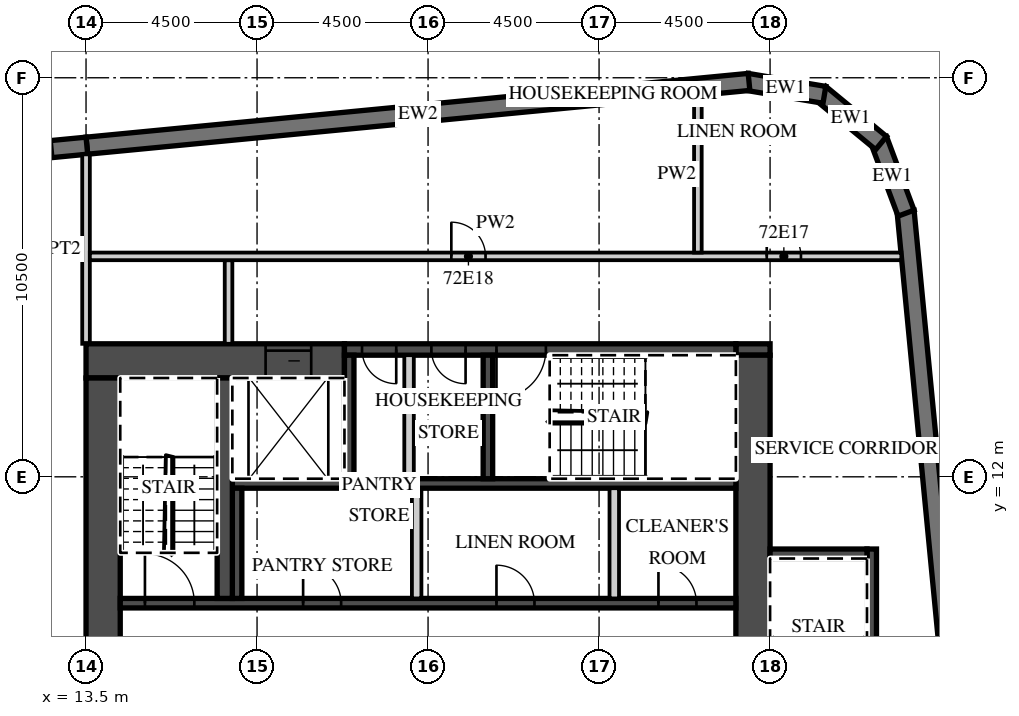
"""IFC4 building model, lengths in metres.
Left out: names, types, materials, properties, quantities, classifications, styles, units other than length and angle.
Written with IfcOpenShell. Run it as: python <this file> out.ifc"""

import sys

from ifc_helpers import new_model, si_unit, direction, frame, frame_2d, origin, place, context, subcontext, project, spatial, polyline, rectangle, outline, extrude, element, fill, save


model = new_model("IFC4")
c1 = context("Model", 3, precision=1e-05, world=origin(), true_north=direction((0.0, 1.0)))
c2 = subcontext(c1, "Body", "Model", "MODEL_VIEW")
j1 = project(units=[si_unit("LENGTHUNIT", "METRE"), si_unit("PLANEANGLEUNIT", "RADIAN")], contexts=[c1])
p1 = place(None, origin())
s1 = spatial("IfcSite", under=j1, at=p1, CompositionType="ELEMENT")
p2 = place(p1, origin())
s2 = spatial("IfcBuilding", under=s1, at=p2, CompositionType="ELEMENT")
p3 = place(p2, frame((0.0, 0.0, 288.3)))
s3 = spatial("IfcBuildingStorey", under=s2, at=p3, CompositionType="ELEMENT", Elevation=288.3)
p4 = place(p3, frame((38.132, -12.858, 0.0), z_axis=(0.0, 0.0, 1.0), x_axis=(-0.095847749461, 0.995396006082, 0.0)))
e1 = element("IfcWall", 1, at=p4, inside=s3, PredefinedType="SOLIDWALL", context=c2, shape_type="SweptSolid", body=[
    extrude(rectangle(XDim=32.0, YDim=0.45, at=frame_2d((16.0, 0.0))), origin(), (0.0, 0.0, 1.0), 3.02),
])
p5 = place(p3, frame((35.078, 18.938, 0.0), z_axis=(0.0, 0.0, 1.0), x_axis=(-0.350192909346, 0.936677599948, 0.0)))
e2 = element("IfcWall", 2, at=p5, inside=s3, PredefinedType="SOLIDWALL", context=c2, shape_type="SweptSolid", body=[
    extrude(outline(polyline([(0.0, -0.225), (2.071, -0.225), (1.95, 0.225), (0.121, 0.225), (0.0, -0.225)])), origin(), (0.0, 0.0, 1.0), 3.02),
])
p6 = place(p3, frame((34.421, 20.782, 0.0), z_axis=(0.0, 0.0, 1.0), x_axis=(-0.771593176315, 0.636116318187, 0.0)))
e3 = element("IfcWall", 3, at=p6, inside=s3, PredefinedType="SOLIDWALL", context=c2, shape_type="SweptSolid", body=[
    extrude(outline(polyline([(0.0, -0.225), (2.071, -0.225), (1.95, 0.225), (0.12, 0.225), (0.0, -0.225)])), origin(), (0.0, 0.0, 1.0), 3.02),
])
p7 = place(p3, frame((32.929, 22.051, 0.0), z_axis=(0.0, 0.0, 1.0), x_axis=(-0.986298144721, 0.164972633245, 0.0)))
e4 = element("IfcWall", 4, at=p7, inside=s3, PredefinedType="SOLIDWALL", context=c2, shape_type="SweptSolid", body=[
    extrude(outline(polyline([(0.0, -0.225), (2.07, -0.225), (1.95, 0.225), (0.121, 0.225), (0.0, -0.225)])), origin(), (0.0, 0.0, 1.0), 3.02),
])
p8 = place(p3, frame((30.946, 22.391, 0.0), z_axis=(0.0, 0.0, 1.0), x_axis=(-0.995396397117, -0.095843688398, 0.0)))
e5 = element("IfcWall", 5, at=p8, inside=s3, PredefinedType="SOLIDWALL", context=c2, shape_type="SweptSolid", body=[
    extrude(rectangle(XDim=17.505, YDim=0.45, at=frame_2d((8.752, 0.0))), origin(), (0.0, 0.0, 1.0), 3.02),
])
p9 = place(p3, frame((13.521, 20.713, 0.0), z_axis=(0.0, 0.0, 1.0), x_axis=(-0.995396277313, -0.095844932638, 0.0)))
e6 = element("IfcWall", 6, at=p9, inside=s3, PredefinedType="SOLIDWALL", context=c2, shape_type="SweptSolid", body=[
    extrude(rectangle(XDim=51.495, YDim=0.45, at=frame_2d((25.748, 0.0))), origin(), (0.0, 0.0, 1.0), 3.02),
])
p10 = place(p9, frame((0.91, 0.0, 0.45)))
e7 = element("IfcOpeningElement", 7, at=p10, cuts=e6, PredefinedType="OPENING", context=c2, shape_type="SweptSolid", body=[
    extrude(rectangle(XDim=2.7, YDim=2.25, at=frame_2d((1.35, 1.125))), frame((0.0, 0.235, 0.0), z_axis=(0.0, -1.0, 0.0), x_axis=(1.0, 0.0, 0.0)), (0.0, 0.0, 1.0), 0.47),
])
p11 = place(p9, frame((5.431, 0.0, 0.45)))
e8 = element("IfcOpeningElement", 8, at=p11, cuts=e6, PredefinedType="OPENING", context=c2, shape_type="SweptSolid", body=[
    extrude(rectangle(XDim=2.7, YDim=2.25, at=frame_2d((1.35, 1.125))), frame((0.0, 0.235, 0.0), z_axis=(0.0, -1.0, 0.0), x_axis=(1.0, 0.0, 0.0)), (0.0, 0.0, 1.0), 0.47),
])
p12 = place(p9, frame((9.952, 0.0, 0.45)))
e9 = element("IfcOpeningElement", 9, at=p12, cuts=e6, PredefinedType="OPENING", context=c2, shape_type="SweptSolid", body=[
    extrude(rectangle(XDim=2.7, YDim=2.25, at=frame_2d((1.35, 1.125))), frame((0.0, 0.235, 0.0), z_axis=(0.0, -1.0, 0.0), x_axis=(1.0, 0.0, 0.0)), (0.0, 0.0, 1.0), 0.47),
])
p13 = place(p9, frame((14.473, 0.0, 0.45)))
e10 = element("IfcOpeningElement", 10, at=p13, cuts=e6, PredefinedType="OPENING", context=c2, shape_type="SweptSolid", body=[
    extrude(rectangle(XDim=2.7, YDim=2.25, at=frame_2d((1.35, 1.125))), frame((0.0, 0.235, 0.0), z_axis=(0.0, -1.0, 0.0), x_axis=(1.0, 0.0, 0.0)), (0.0, 0.0, 1.0), 0.47),
])
p14 = place(p9, frame((18.994, 0.0, 0.45)))
e11 = element("IfcOpeningElement", 11, at=p14, cuts=e6, PredefinedType="OPENING", context=c2, shape_type="SweptSolid", body=[
    extrude(rectangle(XDim=2.7, YDim=2.25, at=frame_2d((1.35, 1.125))), frame((0.0, 0.235, 0.0), z_axis=(0.0, -1.0, 0.0), x_axis=(1.0, 0.0, 0.0)), (0.0, 0.0, 1.0), 0.47),
])
p15 = place(p9, frame((23.514, 0.0, 0.45)))
e12 = element("IfcOpeningElement", 12, at=p15, cuts=e6, PredefinedType="OPENING", context=c2, shape_type="SweptSolid", body=[
    extrude(rectangle(XDim=2.7, YDim=2.25, at=frame_2d((1.35, 1.125))), frame((0.0, 0.235, 0.0), z_axis=(0.0, -1.0, 0.0), x_axis=(1.0, 0.0, 0.0)), (0.0, 0.0, 1.0), 0.47),
])
p16 = place(p9, frame((28.035, 0.0, 0.45)))
e13 = element("IfcOpeningElement", 13, at=p16, cuts=e6, PredefinedType="OPENING", context=c2, shape_type="SweptSolid", body=[
    extrude(rectangle(XDim=2.7, YDim=2.25, at=frame_2d((1.35, 1.125))), frame((0.0, 0.235, 0.0), z_axis=(0.0, -1.0, 0.0), x_axis=(1.0, 0.0, 0.0)), (0.0, 0.0, 1.0), 0.47),
])
p17 = place(p9, frame((32.556, 0.0, 0.45)))
e14 = element("IfcOpeningElement", 14, at=p17, cuts=e6, PredefinedType="OPENING", context=c2, shape_type="SweptSolid", body=[
    extrude(rectangle(XDim=2.7, YDim=2.25, at=frame_2d((1.35, 1.125))), frame((0.0, 0.235, 0.0), z_axis=(0.0, -1.0, 0.0), x_axis=(1.0, 0.0, 0.0)), (0.0, 0.0, 1.0), 0.47),
])
p18 = place(p9, frame((37.077, 0.0, 0.45)))
e15 = element("IfcOpeningElement", 15, at=p18, cuts=e6, PredefinedType="OPENING", context=c2, shape_type="SweptSolid", body=[
    extrude(rectangle(XDim=2.7, YDim=2.25, at=frame_2d((1.35, 1.125))), frame((0.0, 0.235, 0.0), z_axis=(0.0, -1.0, 0.0), x_axis=(1.0, 0.0, 0.0)), (0.0, 0.0, 1.0), 0.47),
])
p19 = place(p9, frame((41.598, 0.0, 0.45)))
e16 = element("IfcOpeningElement", 16, at=p19, cuts=e6, PredefinedType="OPENING", context=c2, shape_type="SweptSolid", body=[
    extrude(rectangle(XDim=2.7, YDim=2.25, at=frame_2d((1.35, 1.125))), frame((0.0, 0.235, 0.0), z_axis=(0.0, -1.0, 0.0), x_axis=(1.0, 0.0, 0.0)), (0.0, 0.0, 1.0), 0.47),
])
p20 = place(p9, frame((46.118, 0.0, 0.45)))
e17 = element("IfcOpeningElement", 17, at=p20, cuts=e6, PredefinedType="OPENING", context=c2, shape_type="SweptSolid", body=[
    extrude(rectangle(XDim=2.7, YDim=2.25, at=frame_2d((1.35, 1.125))), frame((0.0, 0.235, 0.0), z_axis=(0.0, -1.0, 0.0), x_axis=(1.0, 0.0, 0.0)), (0.0, 0.0, 1.0), 0.47),
])
p21 = place(p3, frame((13.5, 15.5, 0.0), z_axis=(0.0, 0.0, 1.0), x_axis=(0.0, 1.0, 0.0)))
e18 = element("IfcWall", 18, at=p21, inside=s3, PredefinedType="PARTITIONING", context=c2, shape_type="SweptSolid", body=[
    extrude(rectangle(XDim=4.985, YDim=0.2, at=frame_2d((2.493, 0.0))), origin(), (0.0, 0.0, 1.0), 3.02),
])
p22 = place(p3, frame((13.5, 15.05, 0.0), z_axis=(0.0, 0.0, 1.0), x_axis=(1.0, 0.0, 0.0)))
e19 = element("IfcWall", 19, at=p22, inside=s3, PredefinedType="SHEAR", context=c2, shape_type="SweptSolid", body=[
    extrude(rectangle(XDim=6.8, YDim=0.9, at=frame_2d((3.4, 0.0))), origin(), (0.0, 0.0, 1.0), 3.02),
])
p23 = place(p22, frame((4.725, 0.0, 0.0)))
e20 = element("IfcOpeningElement", 20, at=p23, cuts=e19, PredefinedType="OPENING", context=c2, shape_type="SweptSolid", body=[
    extrude(rectangle(XDim=1.2, YDim=2.1, at=frame_2d((0.6, 1.05))), frame((0.0, 0.46, 0.0), z_axis=(0.0, -1.0, 0.0), x_axis=(1.0, 0.0, 0.0)), (0.0, 0.0, 1.0), 0.92),
])
p24 = place(p3, frame((30.6, 15.35, 0.0), z_axis=(0.0, 0.0, 1.0), x_axis=(1.0, 0.0, 0.0)))
e21 = element("IfcWall", 21, at=p24, inside=s3, PredefinedType="SHEAR", context=c2, shape_type="SweptSolid", body=[
    extrude(rectangle(XDim=0.9, YDim=0.3, at=frame_2d((0.45, 0.0))), origin(), (0.0, 0.0, 1.0), 3.02),
])
p25 = place(p3, frame((20.3, 15.35, 0.0), z_axis=(0.0, 0.0, 1.0), x_axis=(1.0, 0.0, 0.0)))
e22 = element("IfcWall", 22, at=p25, inside=s3, PredefinedType="SHEAR", context=c2, shape_type="SweptSolid", body=[
    extrude(rectangle(XDim=10.3, YDim=0.3, at=frame_2d((5.15, 0.0))), origin(), (0.0, 0.0, 1.0), 3.02),
])
p26 = place(p25, frame((4.0, 0.0, 0.0)))
e23 = element("IfcOpeningElement", 23, at=p26, cuts=e22, PredefinedType="OPENING", context=c2, shape_type="SweptSolid", body=[
    extrude(rectangle(XDim=1.3, YDim=2.1, at=frame_2d((0.65, 1.05))), frame((0.0, 0.16, 0.0), z_axis=(0.0, -1.0, 0.0), x_axis=(1.0, 0.0, 0.0)), (0.0, 0.0, 1.0), 0.32),
])
p27 = place(p25, frame((2.288, 0.0, 0.0)))
e24 = element("IfcOpeningElement", 24, at=p27, cuts=e22, PredefinedType="OPENING", context=c2, shape_type="SweptSolid", body=[
    extrude(rectangle(XDim=0.9, YDim=2.1, at=frame_2d((0.45, 1.05))), frame((0.0, 0.16, 0.0), z_axis=(0.0, -1.0, 0.0), x_axis=(1.0, 0.0, 0.0)), (0.0, 0.0, 1.0), 0.32),
])
p28 = place(p25, frame((0.462, 0.0, 0.0)))
e25 = element("IfcOpeningElement", 25, at=p28, cuts=e22, PredefinedType="OPENING", context=c2, shape_type="SweptSolid", body=[
    extrude(rectangle(XDim=0.9, YDim=2.1, at=frame_2d((0.45, 1.05))), frame((0.0, 0.16, 0.0), z_axis=(0.0, -1.0, 0.0), x_axis=(1.0, 0.0, 0.0)), (0.0, 0.0, 1.0), 0.32),
])
p29 = place(p3, frame((31.05, 2.4, 0.0), z_axis=(0.0, 0.0, 1.0), x_axis=(0.0, 1.0, 0.0)))
e26 = element("IfcWall", 26, at=p29, inside=s3, PredefinedType="SHEAR", context=c2, shape_type="SweptSolid", body=[
    extrude(rectangle(XDim=12.8, YDim=0.9, at=frame_2d((6.4, 0.0))), origin(), (0.0, 0.0, 1.0), 3.02),
])
p30 = place(p29, frame((0.2, 0.0, 0.0)))
e27 = element("IfcOpeningElement", 27, at=p30, cuts=e26, PredefinedType="OPENING", context=c2, shape_type="SweptSolid", body=[
    extrude(rectangle(XDim=1.1, YDim=2.1, at=frame_2d((0.55, 1.05))), frame((0.0, 0.46, 0.0), z_axis=(0.0, -1.0, 0.0), x_axis=(1.0, 0.0, 0.0)), (0.0, 0.0, 1.0), 0.92),
])
p31 = place(p3, frame((13.95, 2.4, 0.0), z_axis=(0.0, 0.0, 1.0), x_axis=(0.0, 1.0, 0.0)))
e28 = element("IfcWall", 28, at=p31, inside=s3, PredefinedType="SHEAR", context=c2, shape_type="SweptSolid", body=[
    extrude(rectangle(XDim=12.2, YDim=0.9, at=frame_2d((6.1, 0.0))), origin(), (0.0, 0.0, 1.0), 3.02),
])
p32 = place(p3, frame((14.4, 8.675, 0.0), z_axis=(0.0, 0.0, 1.0), x_axis=(1.0, 0.0, 0.0)))
e29 = element("IfcWall", 29, at=p32, inside=s3, PredefinedType="SHEAR", context=c2, shape_type="SweptSolid", body=[
    extrude(rectangle(XDim=16.2, YDim=0.25, at=frame_2d((8.1, 0.0))), origin(), (0.0, 0.0, 1.0), 3.02),
])
p33 = place(p32, frame((0.65, 0.0, 0.0)))
e30 = element("IfcOpeningElement", 30, at=p33, cuts=e29, PredefinedType="OPENING", context=c2, shape_type="SweptSolid", body=[
    extrude(rectangle(XDim=1.3, YDim=2.1, at=frame_2d((0.65, 1.05))), frame((0.0, 0.135, 0.0), z_axis=(0.0, -1.0, 0.0), x_axis=(1.0, 0.0, 0.0)), (0.0, 0.0, 1.0), 0.27),
])
p34 = place(p32, frame((14.163, 0.0, 0.0)))
e31 = element("IfcOpeningElement", 31, at=p34, cuts=e29, PredefinedType="OPENING", context=c2, shape_type="SweptSolid", body=[
    extrude(rectangle(XDim=1.0, YDim=2.1, at=frame_2d((0.5, 1.05))), frame((0.0, 0.135, 0.0), z_axis=(0.0, -1.0, 0.0), x_axis=(1.0, 0.0, 0.0)), (0.0, 0.0, 1.0), 0.27),
])
p35 = place(p32, frame((9.9, 0.0, 0.0)))
e32 = element("IfcOpeningElement", 32, at=p35, cuts=e29, PredefinedType="OPENING", context=c2, shape_type="SweptSolid", body=[
    extrude(rectangle(XDim=1.0, YDim=2.1, at=frame_2d((0.5, 1.05))), frame((0.0, 0.135, 0.0), z_axis=(0.0, -1.0, 0.0), x_axis=(1.0, 0.0, 0.0)), (0.0, 0.0, 1.0), 0.27),
])
p36 = place(p32, frame((4.812, 0.0, 0.0)))
e33 = element("IfcOpeningElement", 33, at=p36, cuts=e29, PredefinedType="OPENING", context=c2, shape_type="SweptSolid", body=[
    extrude(rectangle(XDim=1.0, YDim=2.1, at=frame_2d((0.5, 1.05))), frame((0.0, 0.135, 0.0), z_axis=(0.0, -1.0, 0.0), x_axis=(1.0, 0.0, 0.0)), (0.0, 0.0, 1.0), 0.27),
])
p37 = place(p3, frame((17.35, 11.825, 0.0), z_axis=(0.0, 0.0, 1.0), x_axis=(1.0, 0.0, 0.0)))
e34 = element("IfcWall", 34, at=p37, inside=s3, PredefinedType="SHEAR", context=c2, shape_type="SweptSolid", body=[
    extrude(rectangle(XDim=13.25, YDim=0.25, at=frame_2d((6.625, 0.0))), origin(), (0.0, 0.0, 1.0), 3.02),
])
p38 = place(p3, frame((17.475, 8.8, 0.0), z_axis=(0.0, 0.0, 1.0), x_axis=(0.0, 1.0, 0.0)))
e35 = element("IfcWall", 35, at=p38, inside=s3, PredefinedType="SHEAR", context=c2, shape_type="SweptSolid", body=[
    extrude(rectangle(XDim=2.9, YDim=0.25, at=frame_2d((1.45, 0.0))), origin(), (0.0, 0.0, 1.0), 3.02),
])
for number, where, z_axis, x_axis in (
    (36, (27.4, 8.8, 0.0), (0.0, 0.0, 1.0), (0.0, 1.0, 0.0)),
    (37, (22.2, 8.8, 0.0), (0.0, 0.0, 1.0), (0.0, 1.0, 0.0)),
):
    element("IfcWall", number, at=place(p3, frame(where, z_axis=z_axis, x_axis=x_axis)), inside=s3, PredefinedType="PARTITIONING", context=c2, shape_type="SweptSolid", body=[
        extrude(rectangle(XDim=2.9, YDim=0.25, at=frame_2d((1.45, 0.0))), origin(), (0.0, 0.0, 1.0), 3.02),
    ])
p39 = place(p3, frame((17.15, 8.8, 0.0), z_axis=(0.0, 0.0, 1.0), x_axis=(0.0, 1.0, 0.0)))
e38 = element("IfcWall", 38, at=p39, inside=s3, PredefinedType="SHEAR", context=c2, shape_type="SweptSolid", body=[
    extrude(rectangle(XDim=5.8, YDim=0.4, at=frame_2d((2.9, 0.0))), origin(), (0.0, 0.0, 1.0), 3.02),
])
for number, where, z_axis, x_axis in (
    (39, (20.425, 11.95, 0.0), (0.0, 0.0, 1.0), (0.0, 1.0, 0.0)),
    (40, (24.075, 11.95, 0.0), (0.0, 0.0, 1.0), (0.0, 1.0, 0.0)),
):
    element("IfcWall", number, at=place(p3, frame(where, z_axis=z_axis, x_axis=x_axis)), inside=s3, PredefinedType="SHEAR", context=c2, shape_type="SweptSolid", body=[
        extrude(rectangle(XDim=3.25, YDim=0.25, at=frame_2d((1.625, 0.0))), origin(), (0.0, 0.0, 1.0), 3.02),
    ])
p40 = place(p3, frame((22.0, 11.95, 0.0), z_axis=(0.0, 0.0, 1.0), x_axis=(0.0, 1.0, 0.0)))
e41 = element("IfcWall", 41, at=p40, inside=s3, PredefinedType="PARTITIONING", context=c2, shape_type="SweptSolid", body=[
    extrude(rectangle(XDim=3.25, YDim=0.25, at=frame_2d((1.625, 0.0))), origin(), (0.0, 0.0, 1.0), 3.02),
])
p41 = place(p3, frame((34.175, 1.75, 0.0), z_axis=(0.0, 0.0, 1.0), x_axis=(0.0, 1.0, 0.0)))
e42 = element("IfcWall", 42, at=p41, inside=s3, PredefinedType="SHEAR", context=c2, shape_type="SweptSolid", body=[
    extrude(rectangle(XDim=8.35, YDim=0.25, at=frame_2d((4.175, 0.0))), origin(), (0.0, 0.0, 1.0), 3.02),
])
p42 = place(p3, frame((31.5, 9.975, 0.0), z_axis=(0.0, 0.0, 1.0), x_axis=(1.0, 0.0, 0.0)))
e43 = element("IfcWall", 43, at=p42, inside=s3, PredefinedType="SHEAR", context=c2, shape_type="SweptSolid", body=[
    extrude(rectangle(XDim=2.55, YDim=0.25, at=frame_2d((1.275, 0.0))), origin(), (0.0, 0.0, 1.0), 3.02),
])
p43 = place(p3, frame((17.25, 15.5, 0.0), z_axis=(0.0, 0.0, 1.0), x_axis=(0.0, 1.0, 0.0)))
e44 = element("IfcWall", 44, at=p43, inside=s3, PredefinedType="PARTITIONING", context=c2, shape_type="SweptSolid", body=[
    extrude(rectangle(XDim=2.2, YDim=0.2, at=frame_2d((1.1, 0.0))), origin(), (0.0, 0.0, 1.0), 3.02),
])
p44 = place(p3, frame((13.6, 17.8, 0.0), z_axis=(0.0, 0.0, 1.0), x_axis=(1.0, 0.0, 0.0)))
e45 = element("IfcWall", 45, at=p44, inside=s3, PredefinedType="PARTITIONING", context=c2, shape_type="SweptSolid", body=[
    extrude(rectangle(XDim=21.354, YDim=0.2, at=frame_2d((10.677, 0.0))), origin(), (0.0, 0.0, 1.0), 3.02),
])
p45 = place(p44, frame((17.812, 0.0, 0.0)))
e46 = element("IfcOpeningElement", 46, at=p45, cuts=e45, PredefinedType="OPENING", context=c2, shape_type="SweptSolid", body=[
    extrude(rectangle(XDim=0.9, YDim=2.1, at=frame_2d((0.45, 1.05))), frame((0.0, 0.11, 0.0), z_axis=(0.0, -1.0, 0.0), x_axis=(1.0, 0.0, 0.0)), (0.0, 0.0, 1.0), 0.22),
])
p46 = place(p44, frame((9.512, 0.0, 0.0)))
e47 = element("IfcOpeningElement", 47, at=p46, cuts=e45, PredefinedType="OPENING", context=c2, shape_type="SweptSolid", body=[
    extrude(rectangle(XDim=0.9, YDim=2.1, at=frame_2d((0.45, 1.05))), frame((0.0, 0.11, 0.0), z_axis=(0.0, -1.0, 0.0), x_axis=(1.0, 0.0, 0.0)), (0.0, 0.0, 1.0), 0.22),
])
p47 = place(p3, frame((29.6, 17.9, 0.0), z_axis=(0.0, 0.0, 1.0), x_axis=(0.0, 1.0, 0.0)))
e48 = element("IfcWall", 48, at=p47, inside=s3, PredefinedType="PARTITIONING", context=c2, shape_type="SweptSolid", body=[
    extrude(rectangle(XDim=4.136, YDim=0.2, at=frame_2d((2.068, 0.0))), origin(), (0.0, 0.0, 1.0), 3.02),
])
p48 = place(p10, origin())
e49 = element("IfcWindow", 49, at=p48, inside=s3, PartitioningType="SINGLE_PANEL", PredefinedType="WINDOW", context=c2, shape_type="SweptSolid", body=[
    extrude(rectangle(XDim=2.7, YDim=2.25, at=frame_2d((1.35, 1.125))), frame((0.0, 0.09, 0.0), z_axis=(0.0, -1.0, 0.0), x_axis=(1.0, 0.0, 0.0)), (0.0, 0.0, 1.0), 0.06),
])
fill(e7, e49)
p49 = place(p23, origin())
e50 = element("IfcDoor", 50, at=p49, inside=s3, OperationType="SLIDING_TO_LEFT", PredefinedType="DOOR", context=c2, shape_type="SweptSolid", body=[
    extrude(rectangle(XDim=1.2, YDim=2.1, at=frame_2d((0.6, 1.05))), frame((0.0, 0.025, 0.0), z_axis=(0.0, -1.0, 0.0), x_axis=(1.0, 0.0, 0.0)), (0.0, 0.0, 1.0), 0.05),
])
fill(e20, e50)
p50 = place(p33, origin())
e51 = element("IfcDoor", 51, at=p50, inside=s3, OperationType="SINGLE_SWING_LEFT", PredefinedType="DOOR", context=c2, shape_type="SweptSolid", body=[
    extrude(rectangle(XDim=1.3, YDim=2.1, at=frame_2d((0.65, 1.05))), frame((0.0, 0.025, 0.0), z_axis=(0.0, -1.0, 0.0), x_axis=(1.0, 0.0, 0.0)), (0.0, 0.0, 1.0), 0.05),
])
fill(e30, e51)
p51 = place(p26, origin())
e52 = element("IfcDoor", 52, at=p51, inside=s3, OperationType="SINGLE_SWING_LEFT", PredefinedType="DOOR", context=c2, shape_type="SweptSolid", body=[
    extrude(rectangle(XDim=1.3, YDim=2.1, at=frame_2d((0.65, 1.05))), frame((0.0, 0.025, 0.0), z_axis=(0.0, -1.0, 0.0), x_axis=(1.0, 0.0, 0.0)), (0.0, 0.0, 1.0), 0.05),
])
fill(e23, e52)
p52 = place(p27, origin())
e53 = element("IfcDoor", 53, at=p52, inside=s3, OperationType="SINGLE_SWING_RIGHT", PredefinedType="DOOR", context=c2, shape_type="SweptSolid", body=[
    extrude(rectangle(XDim=0.9, YDim=2.1, at=frame_2d((0.45, 1.05))), frame((0.0, 0.025, 0.0), z_axis=(0.0, -1.0, 0.0), x_axis=(1.0, 0.0, 0.0)), (0.0, 0.0, 1.0), 0.05),
])
fill(e24, e53)
p53 = place(p28, origin())
e54 = element("IfcDoor", 54, at=p53, inside=s3, OperationType="SINGLE_SWING_RIGHT", PredefinedType="DOOR", context=c2, shape_type="SweptSolid", body=[
    extrude(rectangle(XDim=0.9, YDim=2.1, at=frame_2d((0.45, 1.05))), frame((0.0, 0.025, 0.0), z_axis=(0.0, -1.0, 0.0), x_axis=(1.0, 0.0, 0.0)), (0.0, 0.0, 1.0), 0.05),
])
fill(e25, e54)
p54 = place(p34, origin())
e55 = element("IfcDoor", 55, at=p54, inside=s3, OperationType="SINGLE_SWING_LEFT", PredefinedType="DOOR", context=c2, shape_type="SweptSolid", body=[
    extrude(rectangle(XDim=1.0, YDim=2.1, at=frame_2d((0.5, 1.05))), frame((0.0, 0.025, 0.0), z_axis=(0.0, -1.0, 0.0), x_axis=(1.0, 0.0, 0.0)), (0.0, 0.0, 1.0), 0.05),
])
fill(e31, e55)
p55 = place(p35, origin())
e56 = element("IfcDoor", 56, at=p55, inside=s3, OperationType="SINGLE_SWING_LEFT", PredefinedType="DOOR", context=c2, shape_type="SweptSolid", body=[
    extrude(rectangle(XDim=1.0, YDim=2.1, at=frame_2d((0.5, 1.05))), frame((0.0, 0.025, 0.0), z_axis=(0.0, -1.0, 0.0), x_axis=(1.0, 0.0, 0.0)), (0.0, 0.0, 1.0), 0.05),
])
fill(e32, e56)
p56 = place(p36, origin())
e57 = element("IfcDoor", 57, at=p56, inside=s3, OperationType="SINGLE_SWING_LEFT", PredefinedType="DOOR", context=c2, shape_type="SweptSolid", body=[
    extrude(rectangle(XDim=1.0, YDim=2.1, at=frame_2d((0.5, 1.05))), frame((0.0, 0.025, 0.0), z_axis=(0.0, -1.0, 0.0), x_axis=(1.0, 0.0, 0.0)), (0.0, 0.0, 1.0), 0.05),
])
fill(e33, e57)
p57 = place(p45, origin())
e58 = element("IfcDoor", 58, at=p57, inside=s3, OperationType="SINGLE_SWING_LEFT", PredefinedType="DOOR", context=c2, shape_type="SweptSolid", body=[
    extrude(rectangle(XDim=0.9, YDim=2.1, at=frame_2d((0.45, 1.05))), frame((0.0, 0.025, 0.0), z_axis=(0.0, -1.0, 0.0), x_axis=(1.0, 0.0, 0.0)), (0.0, 0.0, 1.0), 0.05),
])
fill(e46, e58)
p58 = place(p46, origin())
e59 = element("IfcDoor", 59, at=p58, inside=s3, OperationType="SINGLE_SWING_LEFT", PredefinedType="DOOR", context=c2, shape_type="SweptSolid", body=[
    extrude(rectangle(XDim=0.9, YDim=2.1, at=frame_2d((0.45, 1.05))), frame((0.0, 0.025, 0.0), z_axis=(0.0, -1.0, 0.0), x_axis=(1.0, 0.0, 0.0)), (0.0, 0.0, 1.0), 0.05),
])
fill(e47, e59)
save(model, sys.argv[1])
